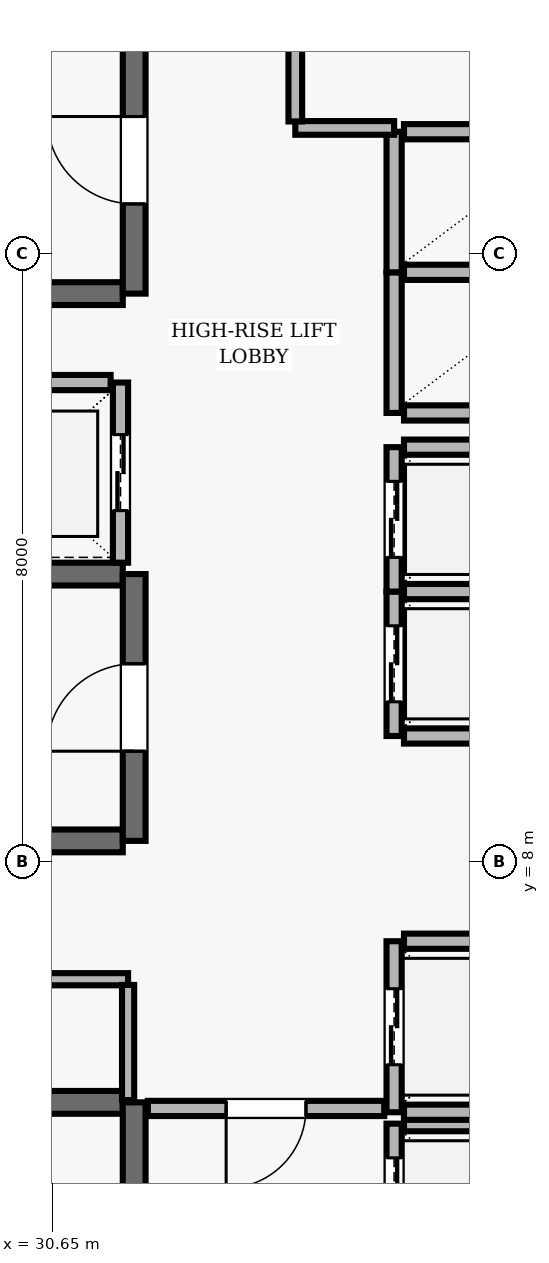
"""IFC4 building model, lengths in metres.
Left out: names, types, materials, properties, quantities, classifications, styles, units other than length and angle.
Written with IfcOpenShell. Run it as: python <this file> out.ifc"""

import sys

from ifc_helpers import new_model, si_unit, direction, frame, frame_2d, origin, place, context, subcontext, project, spatial, rectangle, extrude, element, fill, save


model = new_model("IFC4")
c1 = context("Model", 3, precision=1e-05, world=origin(), true_north=direction((0.0, 1.0)))
c2 = subcontext(c1, "Body", "Model", "MODEL_VIEW")
j1 = project(units=[si_unit("LENGTHUNIT", "METRE"), si_unit("PLANEANGLEUNIT", "RADIAN")], contexts=[c1])
p1 = place(None, origin())
s1 = spatial("IfcSite", under=j1, at=p1, CompositionType="ELEMENT")
p2 = place(p1, origin())
s2 = spatial("IfcBuilding", under=s1, at=p2, CompositionType="ELEMENT")
p3 = place(p2, frame((0.0, 0.0, 218.7)))
s3 = spatial("IfcBuildingStorey", under=s2, at=p3, CompositionType="ELEMENT", Elevation=218.7)
p4 = place(p3, frame((31.58, 4.83, 0.0), z_axis=(0.0, 0.0, 1.0), x_axis=(-1.0, 0.0, 0.0)))
e1 = element("IfcWall", 1, at=p4, inside=s3, PredefinedType="SHEAR", context=c2, shape_type="SweptSolid", body=[
    extrude(rectangle(XDim=8.36, YDim=0.3, at=frame_2d((4.18, 0.0))), origin(), (0.0, 0.0, 1.0), 3.69),
])
p5 = place(p3, frame((31.73, 0.96, 0.0), z_axis=(0.0, 0.0, 1.0), x_axis=(0.0, 1.0, 0.0)))
e2 = element("IfcWall", 2, at=p5, inside=s3, PredefinedType="SHEAR", context=c2, shape_type="SweptSolid", body=[
    extrude(rectangle(XDim=3.87, YDim=0.3, at=frame_2d((1.935, 0.0))), origin(), (0.0, 0.0, 1.0), 3.69),
])
p6 = place(p5, frame((1.54, 0.0, 0.0)))
e3 = element("IfcOpeningElement", 3, at=p6, cuts=e2, PredefinedType="OPENING", context=c2, shape_type="SweptSolid", body=[
    extrude(rectangle(XDim=1.15, YDim=2.15, at=frame_2d((0.575, 1.075))), frame((0.0, 0.16, 0.0), z_axis=(0.0, -1.0, 0.0), x_axis=(1.0, 0.0, 0.0)), (0.0, 0.0, 1.0), 0.32),
])
p7 = place(p3, frame((23.22, 15.47, 0.0), z_axis=(0.0, 0.0, 1.0), x_axis=(1.0, 0.0, 0.0)))
e4 = element("IfcWall", 4, at=p7, inside=s3, PredefinedType="SHEAR", context=c2, shape_type="SweptSolid", body=[
    extrude(rectangle(XDim=8.36, YDim=0.3, at=frame_2d((4.18, 0.0))), origin(), (0.0, 0.0, 1.0), 3.69),
])
p8 = place(p3, frame((31.73, 15.47, 0.0), z_axis=(0.0, 0.0, 1.0), x_axis=(0.0, 1.0, 0.0)))
e5 = element("IfcWall", 5, at=p8, inside=s3, PredefinedType="SHEAR", context=c2, shape_type="SweptSolid", body=[
    extrude(rectangle(XDim=3.51, YDim=0.3, at=frame_2d((1.755, 0.0))), origin(), (0.0, 0.0, 1.0), 3.69),
])
p9 = place(p8, frame((1.18, 0.0, 0.0)))
e6 = element("IfcOpeningElement", 6, at=p9, cuts=e5, PredefinedType="OPENING", context=c2, shape_type="SweptSolid", body=[
    extrude(rectangle(XDim=1.15, YDim=2.15, at=frame_2d((0.575, 1.075))), frame((0.0, 0.16, 0.0), z_axis=(0.0, -1.0, 0.0), x_axis=(1.0, 0.0, 0.0)), (0.0, 0.0, 1.0), 0.32),
])
for number, where, z_axis, x_axis in (
    (7, (31.58, 11.78, 0.0), (0.0, 0.0, 1.0), (-1.0, 0.0, 0.0)),
    (8, (23.22, 8.27, 0.0), (0.0, 0.0, 1.0), (1.0, 0.0, 0.0)),
):
    element("IfcWall", number, at=place(p3, frame(where, z_axis=z_axis, x_axis=x_axis)), inside=s3, PredefinedType="SHEAR", context=c2, shape_type="SweptSolid", body=[
        extrude(rectangle(XDim=8.36, YDim=0.3, at=frame_2d((4.18, 0.0))), origin(), (0.0, 0.0, 1.0), 3.69),
    ])
p10 = place(p3, frame((31.73, 8.27, 0.0), z_axis=(0.0, 0.0, 1.0), x_axis=(0.0, 1.0, 0.0)))
e9 = element("IfcWall", 9, at=p10, inside=s3, PredefinedType="SHEAR", context=c2, shape_type="SweptSolid", body=[
    extrude(rectangle(XDim=3.51, YDim=0.3, at=frame_2d((1.755, 0.0))), origin(), (0.0, 0.0, 1.0), 3.69),
])
p11 = place(p10, frame((1.18, 0.0, 0.0)))
e10 = element("IfcOpeningElement", 10, at=p11, cuts=e9, PredefinedType="OPENING", context=c2, shape_type="SweptSolid", body=[
    extrude(rectangle(XDim=1.15, YDim=2.15, at=frame_2d((0.575, 1.075))), frame((0.0, 0.16, 0.0), z_axis=(0.0, -1.0, 0.0), x_axis=(1.0, 0.0, 0.0)), (0.0, 0.0, 1.0), 0.32),
])
p12 = place(p3, frame((35.15, 4.55, 0.0), z_axis=(0.0, 0.0, 1.0), x_axis=(0.0, -1.0, 0.0)))
e11 = element("IfcWall", 11, at=p12, inside=s3, PredefinedType="SOLIDWALL", context=c2, shape_type="SweptSolid", body=[
    extrude(rectangle(XDim=2.1, YDim=0.2, at=frame_2d((1.05, 0.0))), origin(), (0.0, 0.0, 1.0), 3.69),
])
p13 = place(p12, frame((0.45, 0.0, 0.0)))
e12 = element("IfcOpeningElement", 12, at=p13, cuts=e11, PredefinedType="OPENING", context=c2, shape_type="SweptSolid", body=[
    extrude(rectangle(XDim=1.2, YDim=2.15, at=frame_2d((0.6, 1.075))), frame((0.0, 0.11, 0.0), z_axis=(0.0, -1.0, 0.0), x_axis=(1.0, 0.0, 0.0)), (0.0, 0.0, 1.0), 0.22),
])
p14 = place(p3, frame((37.42, 4.55, 0.0), z_axis=(0.0, 0.0, 1.0), x_axis=(-1.0, 0.0, 0.0)))
e13 = element("IfcWall", 13, at=p14, inside=s3, PredefinedType="SOLIDWALL", context=c2, shape_type="SweptSolid", body=[
    extrude(rectangle(XDim=2.14, YDim=0.2, at=frame_2d((1.07, 0.0))), origin(), (0.0, 0.0, 1.0), 3.69),
])
p15 = place(p3, frame((35.15, 6.95, 0.0), z_axis=(0.0, 0.0, 1.0), x_axis=(0.0, -1.0, 0.0)))
e14 = element("IfcWall", 14, at=p15, inside=s3, PredefinedType="SOLIDWALL", context=c2, shape_type="SweptSolid", body=[
    extrude(rectangle(XDim=2.25, YDim=0.2, at=frame_2d((1.125, 0.0))), origin(), (0.0, 0.0, 1.0), 3.69),
])
p16 = place(p15, frame((0.625, 0.0, 0.0)))
e15 = element("IfcOpeningElement", 15, at=p16, cuts=e14, PredefinedType="OPENING", context=c2, shape_type="SweptSolid", body=[
    extrude(rectangle(XDim=1.0, YDim=2.1, at=frame_2d((0.5, 1.05))), frame((0.0, 0.11, 0.0), z_axis=(0.0, -1.0, 0.0), x_axis=(1.0, 0.0, 0.0)), (0.0, 0.0, 1.0), 0.22),
])
for number, where, z_axis, x_axis in (
    (16, (35.28, 4.7, 0.0), (0.0, 0.0, 1.0), (1.0, 0.0, 0.0)),
    (17, (37.42, 6.95, 0.0), (0.0, 0.0, 1.0), (-1.0, 0.0, 0.0)),
):
    element("IfcWall", number, at=place(p3, frame(where, z_axis=z_axis, x_axis=x_axis)), inside=s3, PredefinedType="SOLIDWALL", context=c2, shape_type="SweptSolid", body=[
        extrude(rectangle(XDim=2.14, YDim=0.2, at=frame_2d((1.07, 0.0))), origin(), (0.0, 0.0, 1.0), 3.69),
    ])
p17 = place(p3, frame((35.15, 11.55, 0.0), z_axis=(0.0, 0.0, 1.0), x_axis=(0.0, -1.0, 0.0)))
e18 = element("IfcWall", 18, at=p17, inside=s3, PredefinedType="SOLIDWALL", context=c2, shape_type="SweptSolid", body=[
    extrude(rectangle(XDim=1.9, YDim=0.2, at=frame_2d((0.95, 0.0))), origin(), (0.0, 0.0, 1.0), 3.69),
])
p18 = place(p17, frame((0.45, 0.0, 0.0)))
e19 = element("IfcOpeningElement", 19, at=p18, cuts=e18, PredefinedType="OPENING", context=c2, shape_type="SweptSolid", body=[
    extrude(rectangle(XDim=1.0, YDim=2.1, at=frame_2d((0.5, 1.05))), frame((0.0, 0.11, 0.0), z_axis=(0.0, -1.0, 0.0), x_axis=(1.0, 0.0, 0.0)), (0.0, 0.0, 1.0), 0.22),
])
for number, where, z_axis, x_axis in (
    (20, (35.28, 9.65, 0.0), (0.0, 0.0, 1.0), (1.0, 0.0, 0.0)),
    (21, (37.42, 11.55, 0.0), (0.0, 0.0, 1.0), (-1.0, 0.0, 0.0)),
):
    element("IfcWall", number, at=place(p3, frame(where, z_axis=z_axis, x_axis=x_axis)), inside=s3, PredefinedType="SOLIDWALL", context=c2, shape_type="SweptSolid", body=[
        extrude(rectangle(XDim=2.14, YDim=0.2, at=frame_2d((1.07, 0.0))), origin(), (0.0, 0.0, 1.0), 3.69),
    ])
p19 = place(p3, frame((35.15, 13.45, 0.0), z_axis=(0.0, 0.0, 1.0), x_axis=(0.0, -1.0, 0.0)))
e22 = element("IfcWall", 22, at=p19, inside=s3, PredefinedType="SOLIDWALL", context=c2, shape_type="SweptSolid", body=[
    extrude(rectangle(XDim=1.9, YDim=0.2, at=frame_2d((0.95, 0.0))), origin(), (0.0, 0.0, 1.0), 3.69),
])
p20 = place(p19, frame((0.45, 0.0, 0.0)))
e23 = element("IfcOpeningElement", 23, at=p20, cuts=e22, PredefinedType="OPENING", context=c2, shape_type="SweptSolid", body=[
    extrude(rectangle(XDim=1.0, YDim=2.1, at=frame_2d((0.5, 1.05))), frame((0.0, 0.11, 0.0), z_axis=(0.0, -1.0, 0.0), x_axis=(1.0, 0.0, 0.0)), (0.0, 0.0, 1.0), 0.22),
])
p21 = place(p3, frame((37.42, 13.45, 0.0), z_axis=(0.0, 0.0, 1.0), x_axis=(-1.0, 0.0, 0.0)))
e24 = element("IfcWall", 24, at=p21, inside=s3, PredefinedType="SOLIDWALL", context=c2, shape_type="SweptSolid", body=[
    extrude(rectangle(XDim=2.14, YDim=0.2, at=frame_2d((1.07, 0.0))), origin(), (0.0, 0.0, 1.0), 3.69),
])
p22 = place(p3, frame((31.55, 11.93, 0.0), z_axis=(0.0, 0.0, 1.0), x_axis=(0.0, 1.0, 0.0)))
e25 = element("IfcWall", 25, at=p22, inside=s3, PredefinedType="SOLIDWALL", context=c2, shape_type="SweptSolid", body=[
    extrude(rectangle(XDim=2.37, YDim=0.2, at=frame_2d((1.185, 0.0))), origin(), (0.0, 0.0, 1.0), 3.69),
])
p23 = place(p22, frame((0.685, 0.0, 0.0)))
e26 = element("IfcOpeningElement", 26, at=p23, cuts=e25, PredefinedType="OPENING", context=c2, shape_type="SweptSolid", body=[
    extrude(rectangle(XDim=1.0, YDim=2.1, at=frame_2d((0.5, 1.05))), frame((0.0, 0.11, 0.0), z_axis=(0.0, -1.0, 0.0), x_axis=(1.0, 0.0, 0.0)), (0.0, 0.0, 1.0), 0.22),
])
p24 = place(p3, frame((31.42, 14.3, 0.0), z_axis=(0.0, 0.0, 1.0), x_axis=(-1.0, 0.0, 0.0)))
e27 = element("IfcWall", 27, at=p24, inside=s3, PredefinedType="SOLIDWALL", context=c2, shape_type="SweptSolid", body=[
    extrude(rectangle(XDim=2.44, YDim=0.2, at=frame_2d((1.22, 0.0))), origin(), (0.0, 0.0, 1.0), 3.69),
])
p25 = place(p3, frame((35.15, 15.75, 0.0), z_axis=(0.0, 0.0, 1.0), x_axis=(0.0, -1.0, 0.0)))
e28 = element("IfcWall", 28, at=p25, inside=s3, PredefinedType="SOLIDWALL", context=c2, shape_type="SweptSolid", body=[
    extrude(rectangle(XDim=1.85, YDim=0.2, at=frame_2d((0.925, 0.0))), origin(), (0.0, 0.0, 1.0), 3.69),
])
for number, where, z_axis, x_axis in (
    (29, (35.28, 13.9, 0.0), (0.0, 0.0, 1.0), (1.0, 0.0, 0.0)),
    (30, (37.42, 15.75, 0.0), (0.0, 0.0, 1.0), (-1.0, 0.0, 0.0)),
):
    element("IfcWall", number, at=place(p3, frame(where, z_axis=z_axis, x_axis=x_axis)), inside=s3, PredefinedType="SOLIDWALL", context=c2, shape_type="SweptSolid", body=[
        extrude(rectangle(XDim=2.14, YDim=0.2, at=frame_2d((1.07, 0.0))), origin(), (0.0, 0.0, 1.0), 3.69),
    ])
p26 = place(p3, frame((35.15, 17.6, 0.0), z_axis=(0.0, 0.0, 1.0), x_axis=(0.0, -1.0, 0.0)))
e31 = element("IfcWall", 31, at=p26, inside=s3, PredefinedType="SOLIDWALL", context=c2, shape_type="SweptSolid", body=[
    extrude(rectangle(XDim=1.85, YDim=0.2, at=frame_2d((0.925, 0.0))), origin(), (0.0, 0.0, 1.0), 3.69),
])
p27 = place(p3, frame((37.42, 17.6, 0.0), z_axis=(0.0, 0.0, 1.0), x_axis=(-1.0, 0.0, 0.0)))
e32 = element("IfcWall", 32, at=p27, inside=s3, PredefinedType="SOLIDWALL", context=c2, shape_type="SweptSolid", body=[
    extrude(rectangle(XDim=2.14, YDim=0.2, at=frame_2d((1.07, 0.0))), origin(), (0.0, 0.0, 1.0), 3.69),
])
p28 = place(p3, frame((28.55, 6.45, 0.0), z_axis=(0.0, 0.0, 1.0), x_axis=(1.0, 0.0, 0.0)))
e33 = element("IfcWall", 33, at=p28, inside=s3, PredefinedType="PARTITIONING", context=c2, shape_type="SweptSolid", body=[
    extrude(rectangle(XDim=3.1, YDim=0.16, at=frame_2d((1.55, 0.0))), origin(), (0.0, 0.0, 1.0), 3.69),
])
p29 = place(p28, frame((1.11, 0.0, 0.0)))
e34 = element("IfcOpeningElement", 34, at=p29, cuts=e33, PredefinedType="OPENING", context=c2, shape_type="SweptSolid", body=[
    extrude(rectangle(XDim=0.88, YDim=2.1, at=frame_2d((0.44, 1.05))), frame((0.0, 0.09, 0.0), z_axis=(0.0, -1.0, 0.0), x_axis=(1.0, 0.0, 0.0)), (0.0, 0.0, 1.0), 0.18),
])
p30 = place(p3, frame((33.85, 17.65, 0.0), z_axis=(0.0, 0.0, 1.0), x_axis=(1.0, 0.0, 0.0)))
e35 = element("IfcWall", 35, at=p30, inside=s3, PredefinedType="PARTITIONING", context=c2, shape_type="SweptSolid", body=[
    extrude(rectangle(XDim=1.3, YDim=0.18, at=frame_2d((0.65, 0.0))), origin(), (0.0, 0.0, 1.0), 3.69),
])
p31 = place(p3, frame((35.02, 4.75, 0.0), z_axis=(0.0, 0.0, 1.0), x_axis=(-1.0, 0.0, 0.0)))
e36 = element("IfcWall", 36, at=p31, inside=s3, PredefinedType="SOLIDWALL", context=c2, shape_type="SweptSolid", body=[
    extrude(rectangle(XDim=3.11, YDim=0.2, at=frame_2d((1.555, 0.0))), origin(), (0.0, 0.0, 1.0), 3.69),
])
p32 = place(p31, frame((1.03, 0.0, 0.0)))
e37 = element("IfcOpeningElement", 37, at=p32, cuts=e36, PredefinedType="OPENING", context=c2, shape_type="SweptSolid", body=[
    extrude(rectangle(XDim=1.05, YDim=2.15, at=frame_2d((0.525, 1.075))), frame((0.0, 0.11, 0.0), z_axis=(0.0, -1.0, 0.0), x_axis=(1.0, 0.0, 0.0)), (0.0, 0.0, 1.0), 0.22),
])
p33 = place(p3, frame((31.65, 4.86, 0.0), z_axis=(0.0, 0.0, 1.0), x_axis=(0.0, 1.0, 0.0)))
e38 = element("IfcWall", 38, at=p33, inside=s3, PredefinedType="PARTITIONING", context=c2, shape_type="SweptSolid", body=[
    extrude(rectangle(XDim=1.515, YDim=0.16, at=frame_2d((0.757, 0.0))), origin(), (0.0, 0.0, 1.0), 3.69),
])
p34 = place(p3, frame((33.85, 17.735, 0.0), z_axis=(0.0, 0.0, 1.0), x_axis=(0.0, 1.0, 0.0)))
e39 = element("IfcWall", 39, at=p34, inside=s3, PredefinedType="PARTITIONING", context=c2, shape_type="SweptSolid", body=[
    extrude(rectangle(XDim=6.03, YDim=0.18, at=frame_2d((3.015, 0.0))), origin(), (0.0, 0.0, 1.0), 3.69),
])
p35 = place(p34, frame((2.54, 0.0, 0.0)))
e40 = element("IfcOpeningElement", 40, at=p35, cuts=e39, PredefinedType="OPENING", context=c2, shape_type="SweptSolid", body=[
    extrude(rectangle(XDim=0.95, YDim=2.1, at=frame_2d((0.475, 1.05))), frame((0.0, 0.1, 0.0), z_axis=(0.0, -1.0, 0.0), x_axis=(1.0, 0.0, 0.0)), (0.0, 0.0, 1.0), 0.2),
])
p36 = place(p9, origin())
e41 = element("IfcDoor", 41, at=p36, inside=s3, OperationType="SINGLE_SWING_RIGHT", PredefinedType="DOOR", context=c2, shape_type="SweptSolid", body=[
    extrude(rectangle(XDim=1.15, YDim=2.15, at=frame_2d((0.575, 1.075))), frame((0.0, 0.025, 0.0), z_axis=(0.0, -1.0, 0.0), x_axis=(1.0, 0.0, 0.0)), (0.0, 0.0, 1.0), 0.05),
])
fill(e6, e41)
p37 = place(p11, origin())
e42 = element("IfcDoor", 42, at=p37, inside=s3, OperationType="SINGLE_SWING_LEFT", PredefinedType="DOOR", context=c2, shape_type="SweptSolid", body=[
    extrude(rectangle(XDim=1.15, YDim=2.15, at=frame_2d((0.575, 1.075))), frame((0.0, 0.025, 0.0), z_axis=(0.0, -1.0, 0.0), x_axis=(1.0, 0.0, 0.0)), (0.0, 0.0, 1.0), 0.05),
])
fill(e10, e42)
p38 = place(p13, origin())
e43 = element("IfcDoor", 43, at=p38, inside=s3, OperationType="DOUBLE_DOOR_SLIDING", PredefinedType="DOOR", context=c2, shape_type="SweptSolid", body=[
    extrude(rectangle(XDim=1.2, YDim=2.15, at=frame_2d((0.6, 1.075))), frame((0.0, 0.025, 0.0), z_axis=(0.0, -1.0, 0.0), x_axis=(1.0, 0.0, 0.0)), (0.0, 0.0, 1.0), 0.05),
])
fill(e12, e43)
p39 = place(p16, origin())
e44 = element("IfcDoor", 44, at=p39, inside=s3, OperationType="DOUBLE_DOOR_SLIDING", PredefinedType="DOOR", context=c2, shape_type="SweptSolid", body=[
    extrude(rectangle(XDim=1.0, YDim=2.1, at=frame_2d((0.5, 1.05))), frame((0.0, 0.025, 0.0), z_axis=(0.0, -1.0, 0.0), x_axis=(1.0, 0.0, 0.0)), (0.0, 0.0, 1.0), 0.05),
])
fill(e15, e44)
p40 = place(p18, origin())
e45 = element("IfcDoor", 45, at=p40, inside=s3, OperationType="DOUBLE_DOOR_SLIDING", PredefinedType="DOOR", context=c2, shape_type="SweptSolid", body=[
    extrude(rectangle(XDim=1.0, YDim=2.1, at=frame_2d((0.5, 1.05))), frame((0.0, 0.025, 0.0), z_axis=(0.0, -1.0, 0.0), x_axis=(1.0, 0.0, 0.0)), (0.0, 0.0, 1.0), 0.05),
])
fill(e19, e45)
p41 = place(p20, origin())
e46 = element("IfcDoor", 46, at=p41, inside=s3, OperationType="DOUBLE_DOOR_SLIDING", PredefinedType="DOOR", context=c2, shape_type="SweptSolid", body=[
    extrude(rectangle(XDim=1.0, YDim=2.1, at=frame_2d((0.5, 1.05))), frame((0.0, 0.025, 0.0), z_axis=(0.0, -1.0, 0.0), x_axis=(1.0, 0.0, 0.0)), (0.0, 0.0, 1.0), 0.05),
])
fill(e23, e46)
p42 = place(p23, origin())
e47 = element("IfcDoor", 47, at=p42, inside=s3, OperationType="DOUBLE_DOOR_SLIDING", PredefinedType="DOOR", context=c2, shape_type="SweptSolid", body=[
    extrude(rectangle(XDim=1.0, YDim=2.1, at=frame_2d((0.5, 1.05))), frame((0.0, 0.025, 0.0), z_axis=(0.0, -1.0, 0.0), x_axis=(1.0, 0.0, 0.0)), (0.0, 0.0, 1.0), 0.05),
])
fill(e26, e47)
p43 = place(p32, origin())
e48 = element("IfcDoor", 48, at=p43, inside=s3, OperationType="SINGLE_SWING_RIGHT", PredefinedType="DOOR", context=c2, shape_type="SweptSolid", body=[
    extrude(rectangle(XDim=1.05, YDim=2.15, at=frame_2d((0.525, 1.075))), frame((0.0, 0.025, 0.0), z_axis=(0.0, -1.0, 0.0), x_axis=(1.0, 0.0, 0.0)), (0.0, 0.0, 1.0), 0.05),
])
fill(e37, e48)
save(model, sys.argv[1])
